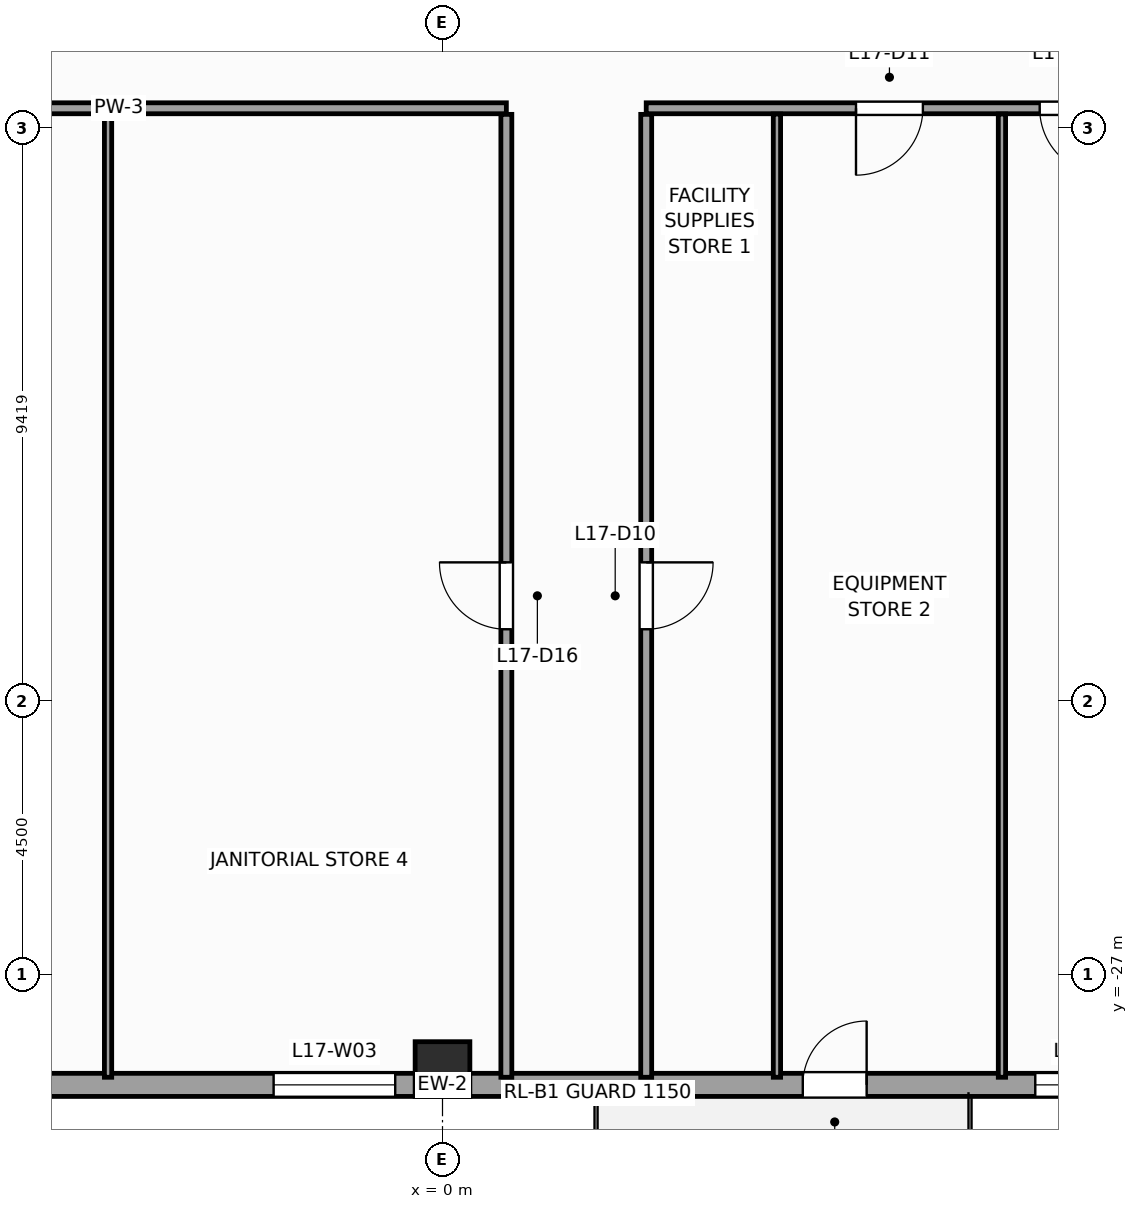
"""IFC4 building model, lengths in metres.
Left out: names, types, materials, properties, quantities, classifications, styles, units other than length and angle.
Written with IfcOpenShell. Run it as: python <this file> out.ifc"""

import sys

from ifc_helpers import new_model, si_unit, direction, frame, frame_2d, origin, origin_2d, place, context, subcontext, project, spatial, rectangle, extrude, source, transform, mapped, element, fill, save


model = new_model("IFC4")
c1 = context("Model", 3, precision=1e-05, world=origin(), true_north=direction((0.0, 1.0)))
c2 = subcontext(c1, "Body", "Model", "MODEL_VIEW")
j1 = project(units=[si_unit("LENGTHUNIT", "METRE"), si_unit("PLANEANGLEUNIT", "RADIAN")], contexts=[c1])
p1 = place(None, origin())
s1 = spatial("IfcSite", under=j1, at=p1, CompositionType="ELEMENT")
p2 = place(p1, origin())
s2 = spatial("IfcBuilding", under=s1, at=p2, CompositionType="ELEMENT")
p3 = place(p2, frame((0.0, 0.0, 74.0)))
s3 = spatial("IfcBuildingStorey", under=s2, at=p3, CompositionType="ELEMENT", Elevation=74.0)
m1 = source(origin(), c2, "Body", "SweptSolid", [
    extrude(rectangle(XDim=0.9, YDim=0.9, at=origin_2d()), origin(), (0.0, 0.0, 1.0), 4.0),
])
p4 = place(p3, frame((0.0, -28.55, 0.0), z_axis=(0.0, 0.0, 1.0), x_axis=(1.0, 0.0, 0.0)))
e1 = element("IfcColumn", 1, at=p4, inside=s3, PredefinedType="COLUMN", context=c2, shape_type="MappedRepresentation", body=[
    mapped(m1, transform((0.0, 0.0, 0.0), scale=1.0)),
])
p5 = place(p3, frame((-25.69, -28.81, 0.0), z_axis=(0.0, 0.0, 1.0), x_axis=(1.0, 0.0, 0.0)))
e2 = element("IfcWall", 2, at=p5, inside=s3, PredefinedType="STANDARD", context=c2, shape_type="SweptSolid", body=[
    extrude(rectangle(XDim=51.38, YDim=0.38, at=frame_2d((25.69, 0.0))), origin(), (0.0, 0.0, 1.0), 2.2),
])
p6 = place(p5, frame((31.615, 0.0, 0.0)))
e3 = element("IfcOpeningElement", 3, at=p6, cuts=e2, PredefinedType="OPENING", context=c2, shape_type="SweptSolid", body=[
    extrude(rectangle(XDim=1.05, YDim=2.02, at=frame_2d((0.525, 1.01))), frame((0.0, 0.2, 0.0), z_axis=(0.0, -1.0, 0.0), x_axis=(1.0, 0.0, 0.0)), (0.0, 0.0, 1.0), 0.4),
])
p7 = place(p5, frame((5.166, 0.0, 0.67)))
e4 = element("IfcOpeningElement", 4, at=p7, cuts=e2, PredefinedType="OPENING", context=c2, shape_type="SweptSolid", body=[
    extrude(rectangle(XDim=2.0, YDim=1.45, at=frame_2d((1.0, 0.725))), frame((0.0, 0.2, 0.0), z_axis=(0.0, -1.0, 0.0), x_axis=(1.0, 0.0, 0.0)), (0.0, 0.0, 1.0), 0.4),
])
p8 = place(p5, frame((13.9, 0.0, 0.67)))
e5 = element("IfcOpeningElement", 5, at=p8, cuts=e2, PredefinedType="OPENING", context=c2, shape_type="SweptSolid", body=[
    extrude(rectangle(XDim=2.0, YDim=1.45, at=frame_2d((1.0, 0.725))), frame((0.0, 0.2, 0.0), z_axis=(0.0, -1.0, 0.0), x_axis=(1.0, 0.0, 0.0)), (0.0, 0.0, 1.0), 0.4),
])
p9 = place(p5, frame((22.912, 0.0, 0.67)))
e6 = element("IfcOpeningElement", 6, at=p9, cuts=e2, PredefinedType="OPENING", context=c2, shape_type="SweptSolid", body=[
    extrude(rectangle(XDim=2.0, YDim=1.45, at=frame_2d((1.0, 0.725))), frame((0.0, 0.2, 0.0), z_axis=(0.0, -1.0, 0.0), x_axis=(1.0, 0.0, 0.0)), (0.0, 0.0, 1.0), 0.4),
])
p10 = place(p5, frame((35.438, 0.0, 0.67)))
e7 = element("IfcOpeningElement", 7, at=p10, cuts=e2, PredefinedType="OPENING", context=c2, shape_type="SweptSolid", body=[
    extrude(rectangle(XDim=2.0, YDim=1.45, at=frame_2d((1.0, 0.725))), frame((0.0, 0.2, 0.0), z_axis=(0.0, -1.0, 0.0), x_axis=(1.0, 0.0, 0.0)), (0.0, 0.0, 1.0), 0.4),
])
p11 = place(p5, frame((43.187, 0.0, 0.67)))
e8 = element("IfcOpeningElement", 8, at=p11, cuts=e2, PredefinedType="OPENING", context=c2, shape_type="SweptSolid", body=[
    extrude(rectangle(XDim=2.0, YDim=1.45, at=frame_2d((1.0, 0.725))), frame((0.0, 0.2, 0.0), z_axis=(0.0, -1.0, 0.0), x_axis=(1.0, 0.0, 0.0)), (0.0, 0.0, 1.0), 0.4),
])
p12 = place(p3, frame((-11.7, -12.75, 0.0), z_axis=(0.0, 0.0, 1.0), x_axis=(1.0, 0.0, 0.0)))
e9 = element("IfcWall", 9, at=p12, inside=s3, PredefinedType="PARTITIONING", context=c2, shape_type="SweptSolid", body=[
    extrude(rectangle(XDim=12.75, YDim=0.18, at=frame_2d((6.375, 0.0))), origin(), (0.0, 0.0, 1.0), 2.56),
])
p13 = place(p3, frame((3.35, -12.75, 0.0), z_axis=(0.0, 0.0, 1.0), x_axis=(1.0, 0.0, 0.0)))
e10 = element("IfcWall", 10, at=p13, inside=s3, PredefinedType="PARTITIONING", context=c2, shape_type="SweptSolid", body=[
    extrude(rectangle(XDim=9.4, YDim=0.18, at=frame_2d((4.7, 0.0))), origin(), (0.0, 0.0, 1.0), 2.2),
])
p14 = place(p13, frame((3.45, 0.0, 0.0)))
e11 = element("IfcOpeningElement", 11, at=p14, cuts=e10, PredefinedType="OPENING", context=c2, shape_type="SweptSolid", body=[
    extrude(rectangle(XDim=1.1, YDim=2.2, at=frame_2d((0.55, 1.1))), frame((0.0, 0.1, 0.0), z_axis=(0.0, -1.0, 0.0), x_axis=(1.0, 0.0, 0.0)), (0.0, 0.0, 1.0), 0.2),
])
p15 = place(p13, frame((6.47, 0.0, 0.0)))
e12 = element("IfcOpeningElement", 12, at=p15, cuts=e10, PredefinedType="OPENING", context=c2, shape_type="SweptSolid", body=[
    extrude(rectangle(XDim=1.1, YDim=2.2, at=frame_2d((0.55, 1.1))), frame((0.0, 0.1, 0.0), z_axis=(0.0, -1.0, 0.0), x_axis=(1.0, 0.0, 0.0)), (0.0, 0.0, 1.0), 0.2),
])
p16 = place(p3, frame((1.05, -28.685, 0.0), z_axis=(0.0, 0.0, 1.0), x_axis=(0.0, 1.0, 0.0)))
e13 = element("IfcWall", 13, at=p16, inside=s3, PredefinedType="PARTITIONING", context=c2, shape_type="SweptSolid", body=[
    extrude(rectangle(XDim=15.835, YDim=0.18, at=frame_2d((7.917, 0.0))), origin(), (0.0, 0.0, 1.0), 3.27),
])
p17 = place(p16, frame((7.367, 0.0, 0.0)))
e14 = element("IfcOpeningElement", 14, at=p17, cuts=e13, PredefinedType="OPENING", context=c2, shape_type="SweptSolid", body=[
    extrude(rectangle(XDim=1.1, YDim=2.2, at=frame_2d((0.55, 1.1))), frame((0.0, 0.1, 0.0), z_axis=(0.0, -1.0, 0.0), x_axis=(1.0, 0.0, 0.0)), (0.0, 0.0, 1.0), 0.2),
])
p18 = place(p3, frame((3.35, -28.685, 0.0), z_axis=(0.0, 0.0, 1.0), x_axis=(0.0, 1.0, 0.0)))
e15 = element("IfcWall", 15, at=p18, inside=s3, PredefinedType="PARTITIONING", context=c2, shape_type="SweptSolid", body=[
    extrude(rectangle(XDim=15.835, YDim=0.18, at=frame_2d((7.917, 0.0))), origin(), (0.0, 0.0, 1.0), 3.6),
])
p19 = place(p18, frame((7.367, 0.0, 0.0)))
e16 = element("IfcOpeningElement", 16, at=p19, cuts=e15, PredefinedType="OPENING", context=c2, shape_type="SweptSolid", body=[
    extrude(rectangle(XDim=1.1, YDim=2.2, at=frame_2d((0.55, 1.1))), frame((0.0, 0.1, 0.0), z_axis=(0.0, -1.0, 0.0), x_axis=(1.0, 0.0, 0.0)), (0.0, 0.0, 1.0), 0.2),
])
p20 = place(p3, frame((5.5, -28.685, 0.0), z_axis=(0.0, 0.0, 1.0), x_axis=(0.0, 1.0, 0.0)))
e17 = element("IfcWall", 17, at=p20, inside=s3, PredefinedType="PARTITIONING", context=c2, shape_type="SweptSolid", body=[
    extrude(rectangle(XDim=15.84, YDim=0.12, at=frame_2d((7.92, 0.0))), origin(), (0.0, 0.0, 1.0), 3.6),
])
p21 = place(p3, frame((9.2, -28.685, 0.0), z_axis=(0.0, 0.0, 1.0), x_axis=(0.0, 1.0, 0.0)))
e18 = element("IfcWall", 18, at=p21, inside=s3, PredefinedType="PARTITIONING", context=c2, shape_type="SweptSolid", body=[
    extrude(rectangle(XDim=15.84, YDim=0.12, at=frame_2d((7.92, 0.0))), origin(), (0.0, 0.0, 1.0), 2.2),
])
p22 = place(p3, frame((-5.5, -28.685, 0.0), z_axis=(0.0, 0.0, 1.0), x_axis=(0.0, 1.0, 0.0)))
e19 = element("IfcWall", 19, at=p22, inside=s3, PredefinedType="PARTITIONING", context=c2, shape_type="SweptSolid", body=[
    extrude(rectangle(XDim=15.84, YDim=0.12, at=frame_2d((7.92, 0.0))), origin(), (0.0, 0.0, 1.0), 3.27),
])
m2 = source(origin(), c2, "Body", "SweptSolid", [
    extrude(rectangle(XDim=1.05, YDim=2.02, at=frame_2d((0.525, 1.01))), frame((0.0, 0.025, 0.0), z_axis=(0.0, -1.0, 0.0), x_axis=(1.0, 0.0, 0.0)), (0.0, 0.0, 1.0), 0.05),
])
p23 = place(p6, origin())
e20 = element("IfcDoor", 20, at=p23, inside=s3, OperationType="SINGLE_SWING_RIGHT", PredefinedType="DOOR", context=c2, shape_type="MappedRepresentation", body=[
    mapped(m2, transform((0.0, 0.0, 0.0), scale=1.0)),
])
fill(e3, e20)
m3 = source(origin(), c2, "Body", "SweptSolid", [
    extrude(rectangle(XDim=2.0, YDim=1.45, at=frame_2d((1.0, 0.725))), frame((0.0, 0.03, 0.0), z_axis=(0.0, -1.0, 0.0), x_axis=(1.0, 0.0, 0.0)), (0.0, 0.0, 1.0), 0.06),
])
p24 = place(p9, origin())
e21 = element("IfcWindow", 21, at=p24, inside=s3, PartitioningType="SINGLE_PANEL", PredefinedType="WINDOW", context=c2, shape_type="MappedRepresentation", body=[
    mapped(m3, transform((0.0, 0.0, 0.0), scale=1.0)),
])
fill(e6, e21)
p25 = place(p10, origin())
e22 = element("IfcWindow", 22, at=p25, inside=s3, PartitioningType="SINGLE_PANEL", PredefinedType="WINDOW", context=c2, shape_type="MappedRepresentation", body=[
    mapped(m3, transform((0.0, 0.0, 0.0), scale=1.0)),
])
fill(e7, e22)
m4 = source(origin(), c2, "Body", "SweptSolid", [
    extrude(rectangle(XDim=1.1, YDim=2.2, at=frame_2d((0.55, 1.1))), frame((0.0, 0.025, 0.0), z_axis=(0.0, -1.0, 0.0), x_axis=(1.0, 0.0, 0.0)), (0.0, 0.0, 1.0), 0.05),
])
p26 = place(p19, frame((1.1, 0.0, 0.0), z_axis=(0.0, 0.0, 1.0), x_axis=(-1.0, 0.0, 0.0)))
e23 = element("IfcDoor", 23, at=p26, inside=s3, OperationType="SINGLE_SWING_RIGHT", PredefinedType="DOOR", context=c2, shape_type="MappedRepresentation", body=[
    mapped(m4, transform((0.0, 0.0, 0.0), scale=1.0)),
])
fill(e16, e23)
p27 = place(p14, frame((1.1, 0.0, 0.0), z_axis=(0.0, 0.0, 1.0), x_axis=(-1.0, 0.0, 0.0)))
e24 = element("IfcDoor", 24, at=p27, inside=s3, OperationType="SINGLE_SWING_LEFT", PredefinedType="DOOR", context=c2, shape_type="MappedRepresentation", body=[
    mapped(m4, transform((0.0, 0.0, 0.0), scale=1.0)),
])
fill(e11, e24)
p28 = place(p15, frame((1.1, 0.0, 0.0), z_axis=(0.0, 0.0, 1.0), x_axis=(-1.0, 0.0, 0.0)))
e25 = element("IfcDoor", 25, at=p28, inside=s3, OperationType="SINGLE_SWING_RIGHT", PredefinedType="DOOR", context=c2, shape_type="MappedRepresentation", body=[
    mapped(m4, transform((0.0, 0.0, 0.0), scale=1.0)),
])
fill(e12, e25)
p29 = place(p17, origin())
e26 = element("IfcDoor", 26, at=p29, inside=s3, OperationType="SINGLE_SWING_RIGHT", PredefinedType="DOOR", context=c2, shape_type="MappedRepresentation", body=[
    mapped(m4, transform((0.0, 0.0, 0.0), scale=1.0)),
])
fill(e14, e26)
save(model, sys.argv[1])
